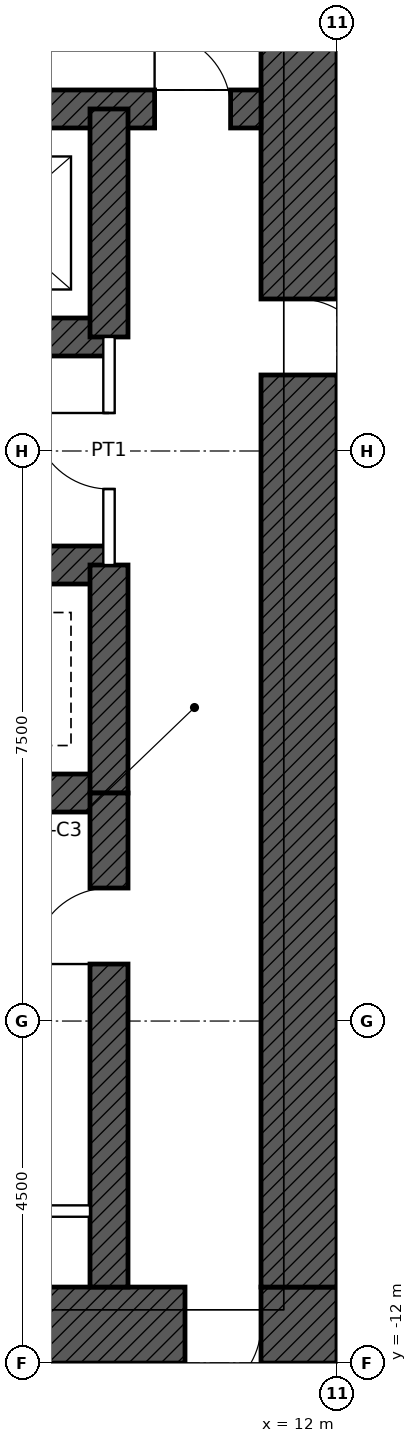
"""IFC4 building model, lengths in metres.
Left out: names, types, materials, properties, quantities, classifications, styles, units other than length and angle.
Written with IfcOpenShell. Run it as: python <this file> out.ifc"""

import sys

from ifc_helpers import new_model, si_unit, direction, frame, frame_2d, origin, place, context, subcontext, project, spatial, rectangle, extrude, element, fill, save


model = new_model("IFC4")
c1 = context("Model", 3, precision=1e-05, world=origin(), true_north=direction((0.0, 1.0)))
c2 = subcontext(c1, "Body", "Model", "MODEL_VIEW")
j1 = project(units=[si_unit("LENGTHUNIT", "METRE"), si_unit("PLANEANGLEUNIT", "RADIAN")], contexts=[c1])
p1 = place(None, origin())
s1 = spatial("IfcSite", under=j1, at=p1, CompositionType="ELEMENT")
p2 = place(p1, origin())
s2 = spatial("IfcBuilding", under=s1, at=p2, CompositionType="ELEMENT")
p3 = place(p2, frame((0.0, 0.0, 98.4)))
s3 = spatial("IfcBuildingStorey", under=s2, at=p3, CompositionType="ELEMENT", Elevation=98.4)
p4 = place(p3, frame((12.0, -11.5, 0.0), z_axis=(0.0, 0.0, 1.0), x_axis=(-1.0, 0.0, 0.0)))
e1 = element("IfcWall", 1, at=p4, inside=s3, PredefinedType="SHEAR", context=c2, shape_type="SweptSolid", body=[
    extrude(rectangle(XDim=24.0, YDim=1.0, at=frame_2d((12.0, 0.0))), origin(), (0.0, 0.0, 1.0), 6.0),
])
p5 = place(p4, frame((10.0, 0.0, 0.0)))
e2 = element("IfcOpeningElement", 2, at=p5, cuts=e1, PredefinedType="OPENING", context=c2, shape_type="SweptSolid", body=[
    extrude(rectangle(XDim=1.0, YDim=2.1, at=frame_2d((0.5, 1.05))), frame((0.0, 0.51, 0.0), z_axis=(0.0, -1.0, 0.0), x_axis=(1.0, 0.0, 0.0)), (0.0, 0.0, 1.0), 1.02),
])
p6 = place(p4, frame((1.0, 0.0, 0.0)))
e3 = element("IfcOpeningElement", 3, at=p6, cuts=e1, PredefinedType="OPENING", context=c2, shape_type="SweptSolid", body=[
    extrude(rectangle(XDim=1.0, YDim=2.4, at=frame_2d((0.5, 1.2))), frame((0.0, 0.51, 0.0), z_axis=(0.0, -1.0, 0.0), x_axis=(1.0, 0.0, 0.0)), (0.0, 0.0, 1.0), 1.02),
])
p7 = place(p3, frame((11.5, 11.0, 0.0), z_axis=(0.0, 0.0, 1.0), x_axis=(0.0, -1.0, 0.0)))
e4 = element("IfcWall", 4, at=p7, inside=s3, PredefinedType="SHEAR", context=c2, shape_type="SweptSolid", body=[
    extrude(rectangle(XDim=22.0, YDim=1.0, at=frame_2d((11.0, 0.0))), origin(), (0.0, 0.0, 1.0), 6.0),
])
p8 = place(p7, frame((9.0, 0.0, 0.0)))
e5 = element("IfcOpeningElement", 5, at=p8, cuts=e4, PredefinedType="OPENING", context=c2, shape_type="SweptSolid", body=[
    extrude(rectangle(XDim=1.0, YDim=2.4, at=frame_2d((0.5, 1.2))), frame((0.0, 0.51, 0.0), z_axis=(0.0, -1.0, 0.0), x_axis=(1.0, 0.0, 0.0)), (0.0, 0.0, 1.0), 1.02),
])
p9 = place(p3, frame((-11.0, 4.5, 0.0), z_axis=(0.0, 0.0, 1.0), x_axis=(1.0, 0.0, 0.0)))
e6 = element("IfcWall", 6, at=p9, inside=s3, PredefinedType="SHEAR", context=c2, shape_type="SweptSolid", body=[
    extrude(rectangle(XDim=22.0, YDim=0.5, at=frame_2d((11.0, 0.0))), origin(), (0.0, 0.0, 1.0), 6.0),
])
p10 = place(p9, frame((0.4, 0.0, 0.0)))
e7 = element("IfcOpeningElement", 7, at=p10, cuts=e6, PredefinedType="OPENING", context=c2, shape_type="SweptSolid", body=[
    extrude(rectangle(XDim=1.0, YDim=2.1, at=frame_2d((0.5, 1.05))), frame((0.0, 0.26, 0.0), z_axis=(0.0, -1.0, 0.0), x_axis=(1.0, 0.0, 0.0)), (0.0, 0.0, 1.0), 0.52),
])
p11 = place(p9, frame((20.6, 0.0, 0.0)))
e8 = element("IfcOpeningElement", 8, at=p11, cuts=e6, PredefinedType="OPENING", context=c2, shape_type="SweptSolid", body=[
    extrude(rectangle(XDim=1.0, YDim=2.1, at=frame_2d((0.5, 1.05))), frame((0.0, 0.26, 0.0), z_axis=(0.0, -1.0, 0.0), x_axis=(1.0, 0.0, 0.0)), (0.0, 0.0, 1.0), 0.52),
])
p12 = place(p3, frame((-9.0, 1.5, 0.0), z_axis=(0.0, 0.0, 1.0), x_axis=(1.0, 0.0, 0.0)))
e9 = element("IfcWall", 9, at=p12, inside=s3, PredefinedType="SHEAR", context=c2, shape_type="SweptSolid", body=[
    extrude(rectangle(XDim=18.0, YDim=0.5, at=frame_2d((9.0, 0.0))), origin(), (0.0, 0.0, 1.0), 6.0),
])
p13 = place(p12, frame((9.95, 0.0, 0.0)))
e10 = element("IfcOpeningElement", 10, at=p13, cuts=e9, PredefinedType="OPENING", context=c2, shape_type="SweptSolid", body=[
    extrude(rectangle(XDim=1.1, YDim=2.1, at=frame_2d((0.55, 1.05))), frame((0.0, 0.26, 0.0), z_axis=(0.0, -1.0, 0.0), x_axis=(1.0, 0.0, 0.0)), (0.0, 0.0, 1.0), 0.52),
])
p14 = place(p12, frame((12.95, 0.0, 0.0)))
e11 = element("IfcOpeningElement", 11, at=p14, cuts=e9, PredefinedType="OPENING", context=c2, shape_type="SweptSolid", body=[
    extrude(rectangle(XDim=1.1, YDim=2.1, at=frame_2d((0.55, 1.05))), frame((0.0, 0.26, 0.0), z_axis=(0.0, -1.0, 0.0), x_axis=(1.0, 0.0, 0.0)), (0.0, 0.0, 1.0), 0.52),
])
p15 = place(p12, frame((15.95, 0.0, 0.0)))
e12 = element("IfcOpeningElement", 12, at=p15, cuts=e9, PredefinedType="OPENING", context=c2, shape_type="SweptSolid", body=[
    extrude(rectangle(XDim=1.1, YDim=2.1, at=frame_2d((0.55, 1.05))), frame((0.0, 0.26, 0.0), z_axis=(0.0, -1.0, 0.0), x_axis=(1.0, 0.0, 0.0)), (0.0, 0.0, 1.0), 0.52),
])
p16 = place(p12, frame((0.95, 0.0, 0.0)))
e13 = element("IfcOpeningElement", 13, at=p16, cuts=e9, PredefinedType="OPENING", context=c2, shape_type="SweptSolid", body=[
    extrude(rectangle(XDim=1.1, YDim=2.1, at=frame_2d((0.55, 1.05))), frame((0.0, 0.26, 0.0), z_axis=(0.0, -1.0, 0.0), x_axis=(1.0, 0.0, 0.0)), (0.0, 0.0, 1.0), 0.52),
])
p17 = place(p12, frame((3.95, 0.0, 0.0)))
e14 = element("IfcOpeningElement", 14, at=p17, cuts=e9, PredefinedType="OPENING", context=c2, shape_type="SweptSolid", body=[
    extrude(rectangle(XDim=1.1, YDim=2.1, at=frame_2d((0.55, 1.05))), frame((0.0, 0.26, 0.0), z_axis=(0.0, -1.0, 0.0), x_axis=(1.0, 0.0, 0.0)), (0.0, 0.0, 1.0), 0.52),
])
p18 = place(p12, frame((6.95, 0.0, 0.0)))
e15 = element("IfcOpeningElement", 15, at=p18, cuts=e9, PredefinedType="OPENING", context=c2, shape_type="SweptSolid", body=[
    extrude(rectangle(XDim=1.1, YDim=2.1, at=frame_2d((0.55, 1.05))), frame((0.0, 0.26, 0.0), z_axis=(0.0, -1.0, 0.0), x_axis=(1.0, 0.0, 0.0)), (0.0, 0.0, 1.0), 0.52),
])
for number, where, z_axis, x_axis in (
    (16, (-9.0, -1.5, 0.0), (0.0, 0.0, 1.0), (1.0, 0.0, 0.0)),
    (17, (-9.0, -4.5, 0.0), (0.0, 0.0, 1.0), (1.0, 0.0, 0.0)),
):
    element("IfcWall", number, at=place(p3, frame(where, z_axis=z_axis, x_axis=x_axis)), inside=s3, PredefinedType="SHEAR", context=c2, shape_type="SweptSolid", body=[
        extrude(rectangle(XDim=18.0, YDim=0.5, at=frame_2d((9.0, 0.0))), origin(), (0.0, 0.0, 1.0), 6.0),
    ])
for number, where, z_axis, x_axis in (
    (18, (9.0, 1.5, 0.0), (0.0, 0.0, 1.0), (0.0, 1.0, 0.0)),
    (19, (9.0, -4.5, 0.0), (0.0, 0.0, 1.0), (0.0, 1.0, 0.0)),
):
    element("IfcWall", number, at=place(p3, frame(where, z_axis=z_axis, x_axis=x_axis)), inside=s3, PredefinedType="SHEAR", context=c2, shape_type="SweptSolid", body=[
        extrude(rectangle(XDim=3.0, YDim=0.5, at=frame_2d((1.5, 0.0))), origin(), (0.0, 0.0, 1.0), 6.0),
    ])
p19 = place(p3, frame((9.0, -11.0, 0.0), z_axis=(0.0, 0.0, 1.0), x_axis=(0.0, 1.0, 0.0)))
e20 = element("IfcWall", 20, at=p19, inside=s3, PredefinedType="SHEAR", context=c2, shape_type="SweptSolid", body=[
    extrude(rectangle(XDim=6.5, YDim=0.5, at=frame_2d((3.25, 0.0))), origin(), (0.0, 0.0, 1.0), 6.0),
])
p20 = place(p19, frame((4.25, 0.0, 0.0)))
e21 = element("IfcOpeningElement", 21, at=p20, cuts=e20, PredefinedType="OPENING", context=c2, shape_type="SweptSolid", body=[
    extrude(rectangle(XDim=1.0, YDim=2.1, at=frame_2d((0.5, 1.05))), frame((0.0, 0.26, 0.0), z_axis=(0.0, -1.0, 0.0), x_axis=(1.0, 0.0, 0.0)), (0.0, 0.0, 1.0), 0.52),
])
p21 = place(p3, frame((3.25, -10.0, 0.0), z_axis=(0.0, 0.0, 1.0), x_axis=(1.0, 0.0, 0.0)))
e22 = element("IfcWall", 22, at=p21, inside=s3, PredefinedType="PARTITIONING", context=c2, shape_type="SweptSolid", body=[
    extrude(rectangle(XDim=5.5, YDim=0.15, at=frame_2d((2.75, 0.0))), origin(), (0.0, 0.0, 1.0), 5.75),
])
p22 = place(p21, frame((2.25, 0.0, 0.0)))
e23 = element("IfcOpeningElement", 23, at=p22, cuts=e22, PredefinedType="OPENING", context=c2, shape_type="SweptSolid", body=[
    extrude(rectangle(XDim=1.0, YDim=2.1, at=frame_2d((0.5, 1.05))), frame((0.0, 0.085, 0.0), z_axis=(0.0, -1.0, 0.0), x_axis=(1.0, 0.0, 0.0)), (0.0, 0.0, 1.0), 0.17),
])
p23 = place(p3, frame((9.0, -1.5, 0.0), z_axis=(0.0, 0.0, 1.0), x_axis=(0.0, 1.0, 0.0)))
e24 = element("IfcWall", 24, at=p23, inside=s3, PredefinedType="PARTITIONING", context=c2, shape_type="SweptSolid", body=[
    extrude(rectangle(XDim=3.0, YDim=0.15, at=frame_2d((1.5, 0.0))), origin(), (0.0, 0.0, 1.0), 5.75),
])
p24 = place(p23, frame((1.0, 0.0, 0.0)))
e25 = element("IfcOpeningElement", 25, at=p24, cuts=e24, PredefinedType="OPENING", context=c2, shape_type="SweptSolid", body=[
    extrude(rectangle(XDim=1.0, YDim=2.4, at=frame_2d((0.5, 1.2))), frame((0.0, 0.085, 0.0), z_axis=(0.0, -1.0, 0.0), x_axis=(1.0, 0.0, 0.0)), (0.0, 0.0, 1.0), 0.17),
])
p25 = place(p11, origin())
e26 = element("IfcDoor", 26, at=p25, inside=s3, OperationType="SINGLE_SWING_LEFT", PredefinedType="DOOR", context=c2, shape_type="SweptSolid", body=[
    extrude(rectangle(XDim=1.0, YDim=2.1, at=frame_2d((0.5, 1.05))), frame((0.0, 0.025, 0.0), z_axis=(0.0, -1.0, 0.0), x_axis=(1.0, 0.0, 0.0)), (0.0, 0.0, 1.0), 0.05),
])
fill(e8, e26)
p26 = place(p8, origin())
e27 = element("IfcDoor", 27, at=p26, inside=s3, OperationType="SINGLE_SWING_RIGHT", PredefinedType="DOOR", context=c2, shape_type="SweptSolid", body=[
    extrude(rectangle(XDim=1.0, YDim=2.4, at=frame_2d((0.5, 1.2))), frame((0.0, 0.485, 0.0), z_axis=(0.0, -1.0, 0.0), x_axis=(1.0, 0.0, 0.0)), (0.0, 0.0, 1.0), 0.05),
])
fill(e5, e27)
p27 = place(p6, origin())
e28 = element("IfcDoor", 28, at=p27, inside=s3, OperationType="SINGLE_SWING_RIGHT", PredefinedType="DOOR", context=c2, shape_type="SweptSolid", body=[
    extrude(rectangle(XDim=1.0, YDim=2.4, at=frame_2d((0.5, 1.2))), frame((0.0, 0.485, 0.0), z_axis=(0.0, -1.0, 0.0), x_axis=(1.0, 0.0, 0.0)), (0.0, 0.0, 1.0), 0.05),
])
fill(e3, e28)
p28 = place(p20, origin())
e29 = element("IfcDoor", 29, at=p28, inside=s3, OperationType="SINGLE_SWING_LEFT", PredefinedType="DOOR", context=c2, shape_type="SweptSolid", body=[
    extrude(rectangle(XDim=1.0, YDim=2.1, at=frame_2d((0.5, 1.05))), frame((0.0, 0.025, 0.0), z_axis=(0.0, -1.0, 0.0), x_axis=(1.0, 0.0, 0.0)), (0.0, 0.0, 1.0), 0.05),
])
fill(e21, e29)
p29 = place(p24, origin())
e30 = element("IfcDoor", 30, at=p29, inside=s3, OperationType="SINGLE_SWING_RIGHT", PredefinedType="DOOR", context=c2, shape_type="SweptSolid", body=[
    extrude(rectangle(XDim=1.0, YDim=2.4, at=frame_2d((0.5, 1.2))), frame((0.0, 0.025, 0.0), z_axis=(0.0, -1.0, 0.0), x_axis=(1.0, 0.0, 0.0)), (0.0, 0.0, 1.0), 0.05),
])
fill(e25, e30)
save(model, sys.argv[1])
